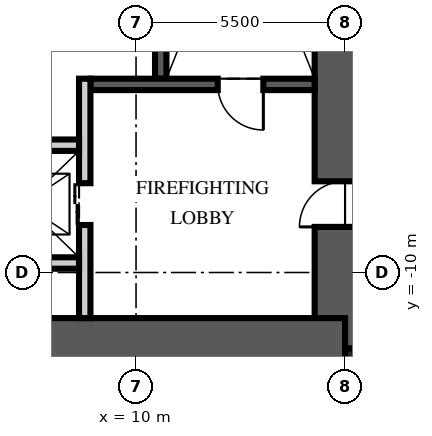
"""IFC4 building model, lengths in metres.
Left out: names, types, materials, properties, quantities, classifications, styles, units other than length and angle.
Written with IfcOpenShell. Run it as: python <this file> out.ifc"""

import sys

from ifc_helpers import new_model, si_unit, direction, frame, frame_2d, origin, origin_2d, place, context, subcontext, project, spatial, rectangle, extrude, element, fill, save


model = new_model("IFC4")
c1 = context("Model", 3, precision=1e-05, world=origin(), true_north=direction((0.0, 1.0)))
c2 = subcontext(c1, "Body", "Model", "MODEL_VIEW")
j1 = project(units=[si_unit("LENGTHUNIT", "METRE"), si_unit("PLANEANGLEUNIT", "RADIAN")], contexts=[c1])
p1 = place(None, origin())
s1 = spatial("IfcSite", under=j1, at=p1, CompositionType="ELEMENT")
p2 = place(p1, origin())
s2 = spatial("IfcBuilding", under=s1, at=p2, CompositionType="ELEMENT")
p3 = place(p2, frame((0.0, 0.0, 259.5)))
s3 = spatial("IfcBuildingStorey", under=s2, at=p3, CompositionType="ELEMENT", Elevation=259.5)
p4 = place(p3, frame((15.5, -12.0, -0.25), z_axis=(0.0, 0.0, 1.0), x_axis=(0.0, 1.0, 0.0)))
e1 = element("IfcWall", 1, at=p4, inside=s3, PredefinedType="SHEAR", context=c2, shape_type="SweptSolid", body=[
    extrude(rectangle(XDim=24.0, YDim=1.6, at=frame_2d((12.0, 0.0))), origin(), (0.0, 0.0, 1.0), 3.75),
])
p5 = place(p4, frame((3.2, 0.0, 0.25)))
e2 = element("IfcOpeningElement", 2, at=p5, cuts=e1, PredefinedType="OPENING", context=c2, shape_type="SweptSolid", body=[
    extrude(rectangle(XDim=1.2, YDim=2.1, at=frame_2d((0.6, 1.05))), frame((0.0, 0.81, 0.0), z_axis=(0.0, -1.0, 0.0), x_axis=(1.0, 0.0, 0.0)), (0.0, 0.0, 1.0), 1.62),
])
p6 = place(p4, frame((19.3, 0.0, 0.25)))
e3 = element("IfcOpeningElement", 3, at=p6, cuts=e1, PredefinedType="OPENING", context=c2, shape_type="SweptSolid", body=[
    extrude(rectangle(XDim=1.8, YDim=2.1, at=frame_2d((0.9, 1.05))), frame((0.0, 0.81, 0.0), z_axis=(0.0, -1.0, 0.0), x_axis=(1.0, 0.0, 0.0)), (0.0, 0.0, 1.0), 1.62),
])
p7 = place(p3, frame((-15.5, -12.0, -0.25), z_axis=(0.0, 0.0, 1.0), x_axis=(1.0, 0.0, 0.0)))
e4 = element("IfcWall", 4, at=p7, inside=s3, PredefinedType="SHEAR", context=c2, shape_type="SweptSolid", body=[
    extrude(rectangle(XDim=31.0, YDim=1.6, at=frame_2d((15.5, 0.0))), origin(), (0.0, 0.0, 1.0), 3.75),
])
p8 = place(p3, frame((15.9, -12.4, -0.25), z_axis=(0.0, 0.0, 1.0), x_axis=(1.0, 0.0, 0.0)))
e5 = element("IfcColumn", 5, at=p8, inside=s3, PredefinedType="COLUMN", context=c2, shape_type="SweptSolid", body=[
    extrude(rectangle(XDim=0.8, YDim=0.8, at=origin_2d()), origin(), (0.0, 0.0, 1.0), 3.75),
])
p9 = place(p3, frame((10.65, -4.9, 0.0), z_axis=(0.0, 0.0, 1.0), x_axis=(0.0, 1.0, 0.0)))
e6 = element("IfcWall", 6, at=p9, inside=s3, PredefinedType="SOLIDWALL", context=c2, shape_type="SweptSolid", body=[
    extrude(rectangle(XDim=10.1, YDim=0.3, at=frame_2d((5.05, 0.0))), origin(), (0.0, 0.0, 1.0), 3.5),
])
p10 = place(p3, frame((14.7, -5.05, 0.0), z_axis=(0.0, 0.0, 1.0), x_axis=(-1.0, 0.0, 0.0)))
e7 = element("IfcWall", 7, at=p10, inside=s3, PredefinedType="SOLIDWALL", context=c2, shape_type="SweptSolid", body=[
    extrude(rectangle(XDim=5.9, YDim=0.3, at=frame_2d((2.95, 0.0))), origin(), (0.0, 0.0, 1.0), 3.5),
])
p11 = place(p10, frame((1.35, 0.0, 0.0)))
e8 = element("IfcOpeningElement", 8, at=p11, cuts=e7, PredefinedType="OPENING", context=c2, shape_type="SweptSolid", body=[
    extrude(rectangle(XDim=1.2, YDim=2.1, at=frame_2d((0.6, 1.05))), frame((0.0, 0.16, 0.0), z_axis=(0.0, -1.0, 0.0), x_axis=(1.0, 0.0, 0.0)), (0.0, 0.0, 1.0), 0.32),
])
p12 = place(p3, frame((8.65, -11.2, 0.0), z_axis=(0.0, 0.0, 1.0), x_axis=(0.0, 1.0, 0.0)))
e9 = element("IfcWall", 9, at=p12, inside=s3, PredefinedType="PARTITIONING", context=c2, shape_type="SweptSolid", body=[
    extrude(rectangle(XDim=6.3, YDim=0.3, at=frame_2d((3.15, 0.0))), origin(), (0.0, 0.0, 1.0), 3.5),
])
p13 = place(p12, frame((2.45, 0.0, 0.0)))
e10 = element("IfcOpeningElement", 10, at=p13, cuts=e9, PredefinedType="OPENING", context=c2, shape_type="SweptSolid", body=[
    extrude(rectangle(XDim=1.1, YDim=2.1, at=frame_2d((0.55, 1.05))), frame((0.0, 0.16, 0.0), z_axis=(0.0, -1.0, 0.0), x_axis=(1.0, 0.0, 0.0)), (0.0, 0.0, 1.0), 0.32),
])
p14 = place(p3, frame((-8.5, -6.65, 0.0), z_axis=(0.0, 0.0, 1.0), x_axis=(1.0, 0.0, 0.0)))
e11 = element("IfcWall", 11, at=p14, inside=s3, PredefinedType="PARTITIONING", context=c2, shape_type="SweptSolid", body=[
    extrude(rectangle(XDim=17.0, YDim=0.3, at=frame_2d((8.5, 0.0))), origin(), (0.0, 0.0, 1.0), 3.5),
])
p15 = place(p14, frame((7.8, 0.0, 0.0)))
e12 = element("IfcOpeningElement", 12, at=p15, cuts=e11, PredefinedType="OPENING", context=c2, shape_type="SweptSolid", body=[
    extrude(rectangle(XDim=1.3, YDim=2.4, at=frame_2d((0.65, 1.2))), frame((0.0, 0.16, 0.0), z_axis=(0.0, -1.0, 0.0), x_axis=(1.0, 0.0, 0.0)), (0.0, 0.0, 1.0), 0.32),
])
p16 = place(p14, frame((5.65, 0.0, 0.0)))
e13 = element("IfcOpeningElement", 13, at=p16, cuts=e11, PredefinedType="OPENING", context=c2, shape_type="SweptSolid", body=[
    extrude(rectangle(XDim=0.9, YDim=2.1, at=frame_2d((0.45, 1.05))), frame((0.0, 0.16, 0.0), z_axis=(0.0, -1.0, 0.0), x_axis=(1.0, 0.0, 0.0)), (0.0, 0.0, 1.0), 0.32),
])
p17 = place(p14, frame((10.4, 0.0, 0.0)))
e14 = element("IfcOpeningElement", 14, at=p17, cuts=e11, PredefinedType="OPENING", context=c2, shape_type="SweptSolid", body=[
    extrude(rectangle(XDim=0.9, YDim=2.1, at=frame_2d((0.45, 1.05))), frame((0.0, 0.16, 0.0), z_axis=(0.0, -1.0, 0.0), x_axis=(1.0, 0.0, 0.0)), (0.0, 0.0, 1.0), 0.32),
])
p18 = place(p3, frame((5.6, -9.75, 0.0), z_axis=(0.0, 0.0, 1.0), x_axis=(1.0, 0.0, 0.0)))
e15 = element("IfcWall", 15, at=p18, inside=s3, PredefinedType="PARTITIONING", context=c2, shape_type="SweptSolid", body=[
    extrude(rectangle(XDim=2.9, YDim=0.3, at=frame_2d((1.45, 0.0))), origin(), (0.0, 0.0, 1.0), 3.5),
])
p19 = place(p11, origin())
e16 = element("IfcDoor", 16, at=p19, inside=s3, OperationType="SINGLE_SWING_LEFT", PredefinedType="DOOR", context=c2, shape_type="SweptSolid", body=[
    extrude(rectangle(XDim=1.2, YDim=2.1, at=frame_2d((0.6, 1.05))), frame((0.0, 0.025, 0.0), z_axis=(0.0, -1.0, 0.0), x_axis=(1.0, 0.0, 0.0)), (0.0, 0.0, 1.0), 0.05),
])
fill(e8, e16)
p20 = place(p5, origin())
e17 = element("IfcDoor", 17, at=p20, inside=s3, OperationType="SINGLE_SWING_LEFT", PredefinedType="DOOR", context=c2, shape_type="SweptSolid", body=[
    extrude(rectangle(XDim=1.2, YDim=2.1, at=frame_2d((0.6, 1.05))), frame((0.0, 0.025, 0.0), z_axis=(0.0, -1.0, 0.0), x_axis=(1.0, 0.0, 0.0)), (0.0, 0.0, 1.0), 0.05),
])
fill(e2, e17)
p21 = place(p13, origin())
e18 = element("IfcDoor", 18, at=p21, inside=s3, OperationType="DOUBLE_DOOR_SLIDING", PredefinedType="DOOR", context=c2, shape_type="SweptSolid", body=[
    extrude(rectangle(XDim=1.1, YDim=2.1, at=frame_2d((0.55, 1.05))), frame((0.0, 0.025, 0.0), z_axis=(0.0, -1.0, 0.0), x_axis=(1.0, 0.0, 0.0)), (0.0, 0.0, 1.0), 0.05),
])
fill(e10, e18)
save(model, sys.argv[1])
